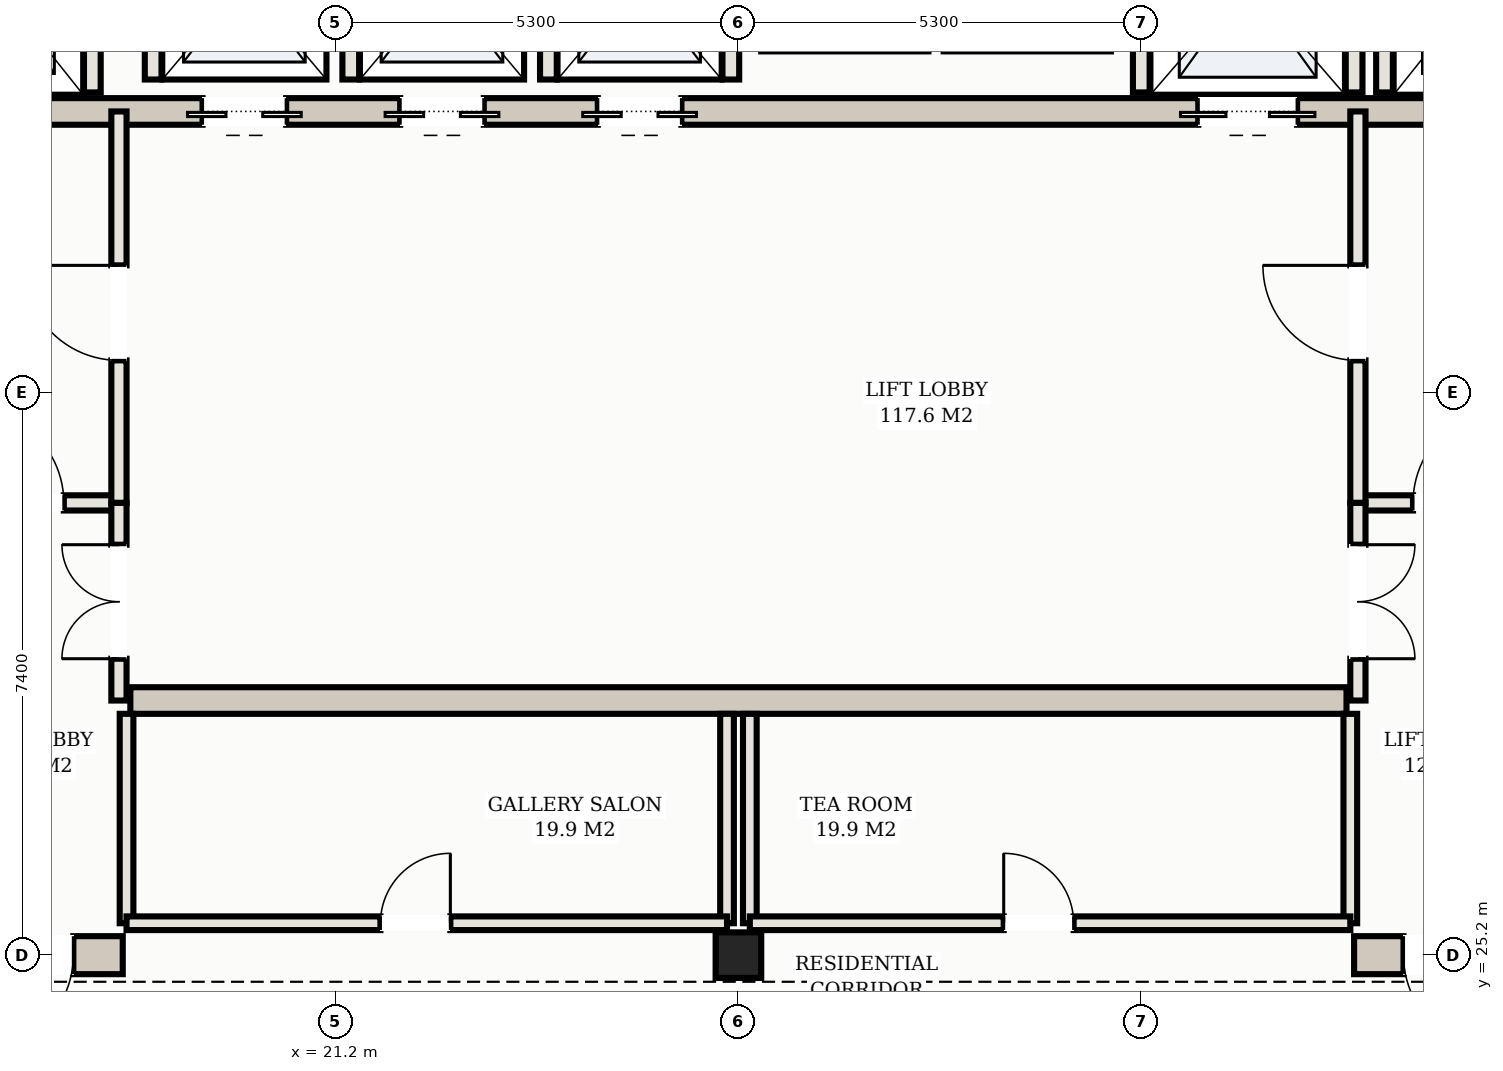
"""IFC4 building model, lengths in metres.
Left out: names, types, materials, properties, quantities, classifications, styles, units other than length and angle.
Written with IfcOpenShell. Run it as: python <this file> out.ifc"""

import sys

from ifc_helpers import new_model, si_unit, direction, frame, frame_2d, origin, origin_2d, place, context, subcontext, project, spatial, rectangle, hollow_rectangle, extrude, element, fill, save


model = new_model("IFC4")
c1 = context("Model", 3, precision=1e-05, world=origin(), true_north=direction((0.0, 1.0)))
c2 = subcontext(c1, "Body", "Model", "MODEL_VIEW")
j1 = project(units=[si_unit("LENGTHUNIT", "METRE"), si_unit("PLANEANGLEUNIT", "RADIAN")], contexts=[c1])
p1 = place(None, origin())
s1 = spatial("IfcSite", under=j1, at=p1, CompositionType="ELEMENT")
p2 = place(p1, origin())
s2 = spatial("IfcBuilding", under=s1, at=p2, CompositionType="ELEMENT")
p3 = place(p2, frame((0.0, 0.0, 262.7)))
s3 = spatial("IfcBuildingStorey", under=s2, at=p3, CompositionType="ELEMENT", Elevation=262.7)
p4 = place(p3, frame((10.35, 25.2, 0.0), z_axis=(0.0, 0.0, 1.0), x_axis=(1.0, 0.0, 0.0)))
e1 = element("IfcWall", 1, at=p4, inside=s3, PredefinedType="SHEAR", context=c2, shape_type="SweptSolid", body=[
    extrude(rectangle(XDim=8.05, YDim=0.5, at=frame_2d((4.025, 0.0))), origin(), (0.0, 0.0, 1.0), 3.04),
])
p5 = place(p4, frame((6.15, 0.0, 0.0)))
e2 = element("IfcOpeningElement", 2, at=p5, cuts=e1, PredefinedType="OPENING", context=c2, shape_type="SweptSolid", body=[
    extrude(rectangle(XDim=1.25, YDim=2.2, at=frame_2d((0.625, 1.1))), frame((0.0, 0.26, 0.0), z_axis=(0.0, -1.0, 0.0), x_axis=(1.0, 0.0, 0.0)), (0.0, 0.0, 1.0), 0.52),
])
p6 = place(p3, frame((34.6, 25.2, 0.0), z_axis=(0.0, 0.0, 1.0), x_axis=(1.0, 0.0, 0.0)))
e3 = element("IfcWall", 3, at=p6, inside=s3, PredefinedType="SHEAR", context=c2, shape_type="SweptSolid", body=[
    extrude(rectangle(XDim=8.05, YDim=0.5, at=frame_2d((4.025, 0.0))), origin(), (0.0, 0.0, 1.0), 3.04),
])
p7 = place(p6, frame((0.65, 0.0, 0.0)))
e4 = element("IfcOpeningElement", 4, at=p7, cuts=e3, PredefinedType="OPENING", context=c2, shape_type="SweptSolid", body=[
    extrude(rectangle(XDim=1.25, YDim=2.2, at=frame_2d((0.625, 1.1))), frame((0.0, 0.26, 0.0), z_axis=(0.0, -1.0, 0.0), x_axis=(1.0, 0.0, 0.0)), (0.0, 0.0, 1.0), 0.52),
])
p8 = place(p3, frame((15.5, 36.3, 0.0), z_axis=(0.0, 0.0, 1.0), x_axis=(1.0, 0.0, 0.0)))
e5 = element("IfcWall", 5, at=p8, inside=s3, PredefinedType="SHEAR", context=c2, shape_type="SweptSolid", body=[
    extrude(rectangle(XDim=22.0, YDim=0.35, at=frame_2d((11.0, 0.0))), origin(), (0.0, 0.0, 1.0), 3.04),
])
p9 = place(p8, frame((0.65, 0.0, 0.0)))
e6 = element("IfcOpeningElement", 6, at=p9, cuts=e5, PredefinedType="OPENING", context=c2, shape_type="SweptSolid", body=[
    extrude(rectangle(XDim=1.1, YDim=2.15, at=frame_2d((0.55, 1.075))), frame((0.0, 0.185, 0.0), z_axis=(0.0, -1.0, 0.0), x_axis=(1.0, 0.0, 0.0)), (0.0, 0.0, 1.0), 0.37),
])
p10 = place(p8, frame((20.25, 0.0, 0.0)))
e7 = element("IfcOpeningElement", 7, at=p10, cuts=e5, PredefinedType="OPENING", context=c2, shape_type="SweptSolid", body=[
    extrude(rectangle(XDim=1.1, YDim=2.15, at=frame_2d((0.55, 1.075))), frame((0.0, 0.185, 0.0), z_axis=(0.0, -1.0, 0.0), x_axis=(1.0, 0.0, 0.0)), (0.0, 0.0, 1.0), 0.37),
])
p11 = place(p8, frame((17.05, 0.0, 0.0)))
e8 = element("IfcOpeningElement", 8, at=p11, cuts=e5, PredefinedType="OPENING", context=c2, shape_type="SweptSolid", body=[
    extrude(rectangle(XDim=1.3, YDim=2.2, at=frame_2d((0.65, 1.1))), frame((0.0, 0.185, 0.0), z_axis=(0.0, -1.0, 0.0), x_axis=(1.0, 0.0, 0.0)), (0.0, 0.0, 1.0), 0.37),
])
p12 = place(p8, frame((3.95, 0.0, 0.0)))
e9 = element("IfcOpeningElement", 9, at=p12, cuts=e5, PredefinedType="OPENING", context=c2, shape_type="SweptSolid", body=[
    extrude(rectangle(XDim=1.1, YDim=2.15, at=frame_2d((0.55, 1.075))), frame((0.0, 0.185, 0.0), z_axis=(0.0, -1.0, 0.0), x_axis=(1.0, 0.0, 0.0)), (0.0, 0.0, 1.0), 0.37),
])
p13 = place(p8, frame((6.55, 0.0, 0.0)))
e10 = element("IfcOpeningElement", 10, at=p13, cuts=e5, PredefinedType="OPENING", context=c2, shape_type="SweptSolid", body=[
    extrude(rectangle(XDim=1.1, YDim=2.15, at=frame_2d((0.55, 1.075))), frame((0.0, 0.185, 0.0), z_axis=(0.0, -1.0, 0.0), x_axis=(1.0, 0.0, 0.0)), (0.0, 0.0, 1.0), 0.37),
])
p14 = place(p8, frame((9.15, 0.0, 0.0)))
e11 = element("IfcOpeningElement", 11, at=p14, cuts=e5, PredefinedType="OPENING", context=c2, shape_type="SweptSolid", body=[
    extrude(rectangle(XDim=1.1, YDim=2.15, at=frame_2d((0.55, 1.075))), frame((0.0, 0.185, 0.0), z_axis=(0.0, -1.0, 0.0), x_axis=(1.0, 0.0, 0.0)), (0.0, 0.0, 1.0), 0.37),
])
p15 = place(p3, frame((18.5, 28.55, 0.0), z_axis=(0.0, 0.0, 1.0), x_axis=(1.0, 0.0, 0.0)))
e12 = element("IfcWall", 12, at=p15, inside=s3, PredefinedType="SHEAR", context=c2, shape_type="SweptSolid", body=[
    extrude(rectangle(XDim=16.0, YDim=0.35, at=frame_2d((8.0, 0.0))), origin(), (0.0, 0.0, 1.0), 3.04),
])
p16 = place(p3, frame((26.5, 25.2, 0.0), z_axis=(0.0, 0.0, 1.0), x_axis=(1.0, 0.0, 0.0)))
e13 = element("IfcColumn", 13, at=p16, inside=s3, PredefinedType="COLUMN", context=c2, shape_type="SweptSolid", body=[
    extrude(hollow_rectangle(XDim=0.6, YDim=0.6, WallThickness=0.022, at=origin_2d()), origin(), (0.0, 0.0, 1.0), 3.3),
])
for number, where, z_axis, x_axis in (
    (14, (18.0, 36.55, 0.0), (0.0, 0.0, 1.0), (0.0, 1.0, 0.0)),
    (15, (35.0, 36.55, 0.0), (0.0, 0.0, 1.0), (0.0, 1.0, 0.0)),
    (16, (31.8, 36.55, 0.0), (0.0, 0.0, 1.0), (0.0, 1.0, 0.0)),
    (17, (34.6, 36.55, 0.0), (0.0, 0.0, 1.0), (0.0, 1.0, 0.0)),
):
    element("IfcWall", number, at=place(p3, frame(where, z_axis=z_axis, x_axis=x_axis)), inside=s3, PredefinedType="SOLIDWALL", context=c2, shape_type="SweptSolid", body=[
        extrude(rectangle(XDim=2.93, YDim=0.22, at=frame_2d((1.465, 0.0))), origin(), (0.0, 0.0, 1.0), 3.04),
    ])
for number, where, z_axis, x_axis in (
    (18, (18.8, 36.72, 0.0), (0.0, 0.0, 1.0), (0.0, 1.0, 0.0)),
    (19, (21.4, 36.72, 0.0), (0.0, 0.0, 1.0), (0.0, 1.0, 0.0)),
    (20, (24.0, 36.72, 0.0), (0.0, 0.0, 1.0), (0.0, 1.0, 0.0)),
    (21, (26.4, 36.72, 0.0), (0.0, 0.0, 1.0), (0.0, 1.0, 0.0)),
):
    element("IfcWall", number, at=place(p3, frame(where, z_axis=z_axis, x_axis=x_axis)), inside=s3, PredefinedType="SOLIDWALL", context=c2, shape_type="SweptSolid", body=[
        extrude(rectangle(XDim=2.56, YDim=0.22, at=frame_2d((1.28, 0.0))), origin(), (0.0, 0.0, 1.0), 3.04),
    ])
p17 = place(p3, frame((15.1, 31.15, 0.0), z_axis=(0.0, 0.0, 1.0), x_axis=(1.0, 0.0, 0.0)))
e22 = element("IfcWall", 22, at=p17, inside=s3, PredefinedType="PARTITIONING", context=c2, shape_type="SweptSolid", body=[
    extrude(rectangle(XDim=3.25, YDim=0.2, at=frame_2d((1.625, 0.0))), origin(), (0.0, 0.0, 1.0), 2.38),
])
p18 = place(p17, frame((1.275, 0.0, 0.0)))
e23 = element("IfcOpeningElement", 23, at=p18, cuts=e22, PredefinedType="OPENING", context=c2, shape_type="SweptSolid", body=[
    extrude(rectangle(XDim=1.25, YDim=2.2, at=frame_2d((0.625, 1.1))), frame((0.0, 0.11, 0.0), z_axis=(0.0, -1.0, 0.0), x_axis=(1.0, 0.0, 0.0)), (0.0, 0.0, 1.0), 0.22),
])
p19 = place(p3, frame((18.35, 31.15, 0.0), z_axis=(0.0, 0.0, 1.0), x_axis=(0.0, 1.0, 0.0)))
e24 = element("IfcWall", 24, at=p19, inside=s3, PredefinedType="PARTITIONING", context=c2, shape_type="SweptSolid", body=[
    extrude(rectangle(XDim=5.15, YDim=0.2, at=frame_2d((2.575, 0.0))), origin(), (0.0, 0.0, 1.0), 2.38),
])
p20 = place(p19, frame((1.875, 0.0, 0.0)))
e25 = element("IfcOpeningElement", 25, at=p20, cuts=e24, PredefinedType="OPENING", context=c2, shape_type="SweptSolid", body=[
    extrude(rectangle(XDim=1.25, YDim=2.2, at=frame_2d((0.625, 1.1))), frame((0.0, 0.11, 0.0), z_axis=(0.0, -1.0, 0.0), x_axis=(1.0, 0.0, 0.0)), (0.0, 0.0, 1.0), 0.22),
])
p21 = place(p3, frame((34.65, 31.15, 0.0), z_axis=(0.0, 0.0, 1.0), x_axis=(1.0, 0.0, 0.0)))
e26 = element("IfcWall", 26, at=p21, inside=s3, PredefinedType="PARTITIONING", context=c2, shape_type="SweptSolid", body=[
    extrude(rectangle(XDim=3.25, YDim=0.2, at=frame_2d((1.625, 0.0))), origin(), (0.0, 0.0, 1.0), 2.38),
])
p22 = place(p21, frame((0.725, 0.0, 0.0)))
e27 = element("IfcOpeningElement", 27, at=p22, cuts=e26, PredefinedType="OPENING", context=c2, shape_type="SweptSolid", body=[
    extrude(rectangle(XDim=1.25, YDim=2.2, at=frame_2d((0.625, 1.1))), frame((0.0, 0.11, 0.0), z_axis=(0.0, -1.0, 0.0), x_axis=(1.0, 0.0, 0.0)), (0.0, 0.0, 1.0), 0.22),
])
p23 = place(p3, frame((34.65, 31.15, 0.0), z_axis=(0.0, 0.0, 1.0), x_axis=(0.0, 1.0, 0.0)))
e28 = element("IfcWall", 28, at=p23, inside=s3, PredefinedType="PARTITIONING", context=c2, shape_type="SweptSolid", body=[
    extrude(rectangle(XDim=5.15, YDim=0.2, at=frame_2d((2.575, 0.0))), origin(), (0.0, 0.0, 1.0), 2.38),
])
p24 = place(p23, frame((1.875, 0.0, 0.0)))
e29 = element("IfcOpeningElement", 29, at=p24, cuts=e28, PredefinedType="OPENING", context=c2, shape_type="SweptSolid", body=[
    extrude(rectangle(XDim=1.25, YDim=2.2, at=frame_2d((0.625, 1.1))), frame((0.0, 0.11, 0.0), z_axis=(0.0, -1.0, 0.0), x_axis=(1.0, 0.0, 0.0)), (0.0, 0.0, 1.0), 0.22),
])
p25 = place(p3, frame((18.35, 28.55, 0.0), z_axis=(0.0, 0.0, 1.0), x_axis=(0.0, 1.0, 0.0)))
e30 = element("IfcWall", 30, at=p25, inside=s3, PredefinedType="PARTITIONING", context=c2, shape_type="SweptSolid", body=[
    extrude(rectangle(XDim=2.6, YDim=0.2, at=frame_2d((1.3, 0.0))), origin(), (0.0, 0.0, 1.0), 2.38),
])
p26 = place(p25, frame((0.55, 0.0, 0.0)))
e31 = element("IfcOpeningElement", 31, at=p26, cuts=e30, PredefinedType="OPENING", context=c2, shape_type="SweptSolid", body=[
    extrude(rectangle(XDim=1.5, YDim=2.25, at=frame_2d((0.75, 1.125))), frame((0.0, 0.11, 0.0), z_axis=(0.0, -1.0, 0.0), x_axis=(1.0, 0.0, 0.0)), (0.0, 0.0, 1.0), 0.22),
])
p27 = place(p3, frame((34.65, 28.55, 0.0), z_axis=(0.0, 0.0, 1.0), x_axis=(0.0, 1.0, 0.0)))
e32 = element("IfcWall", 32, at=p27, inside=s3, PredefinedType="PARTITIONING", context=c2, shape_type="SweptSolid", body=[
    extrude(rectangle(XDim=2.6, YDim=0.2, at=frame_2d((1.3, 0.0))), origin(), (0.0, 0.0, 1.0), 2.38),
])
p28 = place(p27, frame((0.55, 0.0, 0.0)))
e33 = element("IfcOpeningElement", 33, at=p28, cuts=e32, PredefinedType="OPENING", context=c2, shape_type="SweptSolid", body=[
    extrude(rectangle(XDim=1.5, YDim=2.25, at=frame_2d((0.75, 1.125))), frame((0.0, 0.11, 0.0), z_axis=(0.0, -1.0, 0.0), x_axis=(1.0, 0.0, 0.0)), (0.0, 0.0, 1.0), 0.22),
])
for number, where, z_axis, x_axis in (
    (34, (18.45, 25.62, 0.0), (0.0, 0.0, 1.0), (0.0, 1.0, 0.0)),
    (35, (26.35, 25.62, 0.0), (0.0, 0.0, 1.0), (0.0, 1.0, 0.0)),
):
    element("IfcWall", number, at=place(p3, frame(where, z_axis=z_axis, x_axis=x_axis)), inside=s3, PredefinedType="PARTITIONING", context=c2, shape_type="SweptSolid", body=[
        extrude(rectangle(XDim=2.755, YDim=0.18, at=frame_2d((1.377, 0.0))), origin(), (0.0, 0.0, 1.0), 2.38),
    ])
p29 = place(p3, frame((18.45, 25.62, 0.0), z_axis=(0.0, 0.0, 1.0), x_axis=(1.0, 0.0, 0.0)))
e36 = element("IfcWall", 36, at=p29, inside=s3, PredefinedType="PARTITIONING", context=c2, shape_type="SweptSolid", body=[
    extrude(rectangle(XDim=7.9, YDim=0.18, at=frame_2d((3.95, 0.0))), origin(), (0.0, 0.0, 1.0), 2.38),
])
p30 = place(p29, frame((3.34, 0.0, 0.0)))
e37 = element("IfcOpeningElement", 37, at=p30, cuts=e36, PredefinedType="OPENING", context=c2, shape_type="SweptSolid", body=[
    extrude(rectangle(XDim=0.92, YDim=2.15, at=frame_2d((0.46, 1.075))), frame((0.0, 0.1, 0.0), z_axis=(0.0, -1.0, 0.0), x_axis=(1.0, 0.0, 0.0)), (0.0, 0.0, 1.0), 0.2),
])
for number, where, z_axis, x_axis in (
    (38, (26.65, 25.62, 0.0), (0.0, 0.0, 1.0), (0.0, 1.0, 0.0)),
    (39, (34.55, 25.62, 0.0), (0.0, 0.0, 1.0), (0.0, 1.0, 0.0)),
):
    element("IfcWall", number, at=place(p3, frame(where, z_axis=z_axis, x_axis=x_axis)), inside=s3, PredefinedType="PARTITIONING", context=c2, shape_type="SweptSolid", body=[
        extrude(rectangle(XDim=2.755, YDim=0.18, at=frame_2d((1.377, 0.0))), origin(), (0.0, 0.0, 1.0), 2.38),
    ])
p31 = place(p3, frame((26.65, 25.62, 0.0), z_axis=(0.0, 0.0, 1.0), x_axis=(1.0, 0.0, 0.0)))
e40 = element("IfcWall", 40, at=p31, inside=s3, PredefinedType="PARTITIONING", context=c2, shape_type="SweptSolid", body=[
    extrude(rectangle(XDim=7.9, YDim=0.18, at=frame_2d((3.95, 0.0))), origin(), (0.0, 0.0, 1.0), 2.38),
])
p32 = place(p31, frame((3.34, 0.0, 0.0)))
e41 = element("IfcOpeningElement", 41, at=p32, cuts=e40, PredefinedType="OPENING", context=c2, shape_type="SweptSolid", body=[
    extrude(rectangle(XDim=0.92, YDim=2.15, at=frame_2d((0.46, 1.075))), frame((0.0, 0.1, 0.0), z_axis=(0.0, -1.0, 0.0), x_axis=(1.0, 0.0, 0.0)), (0.0, 0.0, 1.0), 0.2),
])
p33 = place(p11, frame((1.3, 0.0, 0.0), z_axis=(0.0, 0.0, 1.0), x_axis=(-1.0, 0.0, 0.0)))
e42 = element("IfcDoor", 42, at=p33, inside=s3, OperationType="DOUBLE_DOOR_SLIDING", PredefinedType="DOOR", context=c2, shape_type="SweptSolid", body=[
    extrude(rectangle(XDim=1.3, YDim=2.2, at=frame_2d((0.65, 1.1))), frame((0.0, 0.025, 0.0), z_axis=(0.0, -1.0, 0.0), x_axis=(1.0, 0.0, 0.0)), (0.0, 0.0, 1.0), 0.05),
])
fill(e8, e42)
p34 = place(p12, frame((1.1, 0.0, 0.0), z_axis=(0.0, 0.0, 1.0), x_axis=(-1.0, 0.0, 0.0)))
e43 = element("IfcDoor", 43, at=p34, inside=s3, OperationType="DOUBLE_DOOR_SLIDING", PredefinedType="DOOR", context=c2, shape_type="SweptSolid", body=[
    extrude(rectangle(XDim=1.1, YDim=2.15, at=frame_2d((0.55, 1.075))), frame((0.0, 0.025, 0.0), z_axis=(0.0, -1.0, 0.0), x_axis=(1.0, 0.0, 0.0)), (0.0, 0.0, 1.0), 0.05),
])
fill(e9, e43)
p35 = place(p13, frame((1.1, 0.0, 0.0), z_axis=(0.0, 0.0, 1.0), x_axis=(-1.0, 0.0, 0.0)))
e44 = element("IfcDoor", 44, at=p35, inside=s3, OperationType="DOUBLE_DOOR_SLIDING", PredefinedType="DOOR", context=c2, shape_type="SweptSolid", body=[
    extrude(rectangle(XDim=1.1, YDim=2.15, at=frame_2d((0.55, 1.075))), frame((0.0, 0.025, 0.0), z_axis=(0.0, -1.0, 0.0), x_axis=(1.0, 0.0, 0.0)), (0.0, 0.0, 1.0), 0.05),
])
fill(e10, e44)
p36 = place(p14, frame((1.1, 0.0, 0.0), z_axis=(0.0, 0.0, 1.0), x_axis=(-1.0, 0.0, 0.0)))
e45 = element("IfcDoor", 45, at=p36, inside=s3, OperationType="DOUBLE_DOOR_SLIDING", PredefinedType="DOOR", context=c2, shape_type="SweptSolid", body=[
    extrude(rectangle(XDim=1.1, YDim=2.15, at=frame_2d((0.55, 1.075))), frame((0.0, 0.025, 0.0), z_axis=(0.0, -1.0, 0.0), x_axis=(1.0, 0.0, 0.0)), (0.0, 0.0, 1.0), 0.05),
])
fill(e11, e45)
p37 = place(p5, frame((1.25, 0.0, 0.0), z_axis=(0.0, 0.0, 1.0), x_axis=(-1.0, 0.0, 0.0)))
e46 = element("IfcDoor", 46, at=p37, inside=s3, OperationType="SINGLE_SWING_RIGHT", PredefinedType="DOOR", context=c2, shape_type="SweptSolid", body=[
    extrude(rectangle(XDim=1.25, YDim=2.2, at=frame_2d((0.625, 1.1))), frame((0.0, 0.025, 0.0), z_axis=(0.0, -1.0, 0.0), x_axis=(1.0, 0.0, 0.0)), (0.0, 0.0, 1.0), 0.05),
])
fill(e2, e46)
p38 = place(p7, frame((1.25, 0.0, 0.0), z_axis=(0.0, 0.0, 1.0), x_axis=(-1.0, 0.0, 0.0)))
e47 = element("IfcDoor", 47, at=p38, inside=s3, OperationType="SINGLE_SWING_LEFT", PredefinedType="DOOR", context=c2, shape_type="SweptSolid", body=[
    extrude(rectangle(XDim=1.25, YDim=2.2, at=frame_2d((0.625, 1.1))), frame((0.0, 0.025, 0.0), z_axis=(0.0, -1.0, 0.0), x_axis=(1.0, 0.0, 0.0)), (0.0, 0.0, 1.0), 0.05),
])
fill(e4, e47)
p39 = place(p18, origin())
e48 = element("IfcDoor", 48, at=p39, inside=s3, OperationType="SINGLE_SWING_LEFT", PredefinedType="DOOR", context=c2, shape_type="SweptSolid", body=[
    extrude(rectangle(XDim=1.25, YDim=2.2, at=frame_2d((0.625, 1.1))), frame((0.0, 0.025, 0.0), z_axis=(0.0, -1.0, 0.0), x_axis=(1.0, 0.0, 0.0)), (0.0, 0.0, 1.0), 0.05),
])
fill(e23, e48)
p40 = place(p20, origin())
e49 = element("IfcDoor", 49, at=p40, inside=s3, OperationType="SINGLE_SWING_RIGHT", PredefinedType="DOOR", context=c2, shape_type="SweptSolid", body=[
    extrude(rectangle(XDim=1.25, YDim=2.2, at=frame_2d((0.625, 1.1))), frame((0.0, 0.025, 0.0), z_axis=(0.0, -1.0, 0.0), x_axis=(1.0, 0.0, 0.0)), (0.0, 0.0, 1.0), 0.05),
])
fill(e25, e49)
p41 = place(p22, origin())
e50 = element("IfcDoor", 50, at=p41, inside=s3, OperationType="SINGLE_SWING_RIGHT", PredefinedType="DOOR", context=c2, shape_type="SweptSolid", body=[
    extrude(rectangle(XDim=1.25, YDim=2.2, at=frame_2d((0.625, 1.1))), frame((0.0, 0.025, 0.0), z_axis=(0.0, -1.0, 0.0), x_axis=(1.0, 0.0, 0.0)), (0.0, 0.0, 1.0), 0.05),
])
fill(e27, e50)
p42 = place(p24, origin())
e51 = element("IfcDoor", 51, at=p42, inside=s3, OperationType="SINGLE_SWING_RIGHT", PredefinedType="DOOR", context=c2, shape_type="SweptSolid", body=[
    extrude(rectangle(XDim=1.25, YDim=2.2, at=frame_2d((0.625, 1.1))), frame((0.0, 0.025, 0.0), z_axis=(0.0, -1.0, 0.0), x_axis=(1.0, 0.0, 0.0)), (0.0, 0.0, 1.0), 0.05),
])
fill(e29, e51)
p43 = place(p26, origin())
e52 = element("IfcDoor", 52, at=p43, inside=s3, OperationType="DOUBLE_DOOR_SINGLE_SWING", PredefinedType="DOOR", context=c2, shape_type="SweptSolid", body=[
    extrude(rectangle(XDim=1.5, YDim=2.25, at=frame_2d((0.75, 1.125))), frame((0.0, 0.025, 0.0), z_axis=(0.0, -1.0, 0.0), x_axis=(1.0, 0.0, 0.0)), (0.0, 0.0, 1.0), 0.05),
])
fill(e31, e52)
p44 = place(p28, frame((1.5, 0.0, 0.0), z_axis=(0.0, 0.0, 1.0), x_axis=(-1.0, 0.0, 0.0)))
e53 = element("IfcDoor", 53, at=p44, inside=s3, OperationType="DOUBLE_DOOR_SINGLE_SWING", PredefinedType="DOOR", context=c2, shape_type="SweptSolid", body=[
    extrude(rectangle(XDim=1.5, YDim=2.25, at=frame_2d((0.75, 1.125))), frame((0.0, 0.025, 0.0), z_axis=(0.0, -1.0, 0.0), x_axis=(1.0, 0.0, 0.0)), (0.0, 0.0, 1.0), 0.05),
])
fill(e33, e53)
p45 = place(p30, origin())
e54 = element("IfcDoor", 54, at=p45, inside=s3, OperationType="SINGLE_SWING_RIGHT", PredefinedType="DOOR", context=c2, shape_type="SweptSolid", body=[
    extrude(rectangle(XDim=0.92, YDim=2.15, at=frame_2d((0.46, 1.075))), frame((0.0, 0.025, 0.0), z_axis=(0.0, -1.0, 0.0), x_axis=(1.0, 0.0, 0.0)), (0.0, 0.0, 1.0), 0.05),
])
fill(e37, e54)
p46 = place(p32, origin())
e55 = element("IfcDoor", 55, at=p46, inside=s3, OperationType="SINGLE_SWING_LEFT", PredefinedType="DOOR", context=c2, shape_type="SweptSolid", body=[
    extrude(rectangle(XDim=0.92, YDim=2.15, at=frame_2d((0.46, 1.075))), frame((0.0, 0.025, 0.0), z_axis=(0.0, -1.0, 0.0), x_axis=(1.0, 0.0, 0.0)), (0.0, 0.0, 1.0), 0.05),
])
fill(e41, e55)
save(model, sys.argv[1])
